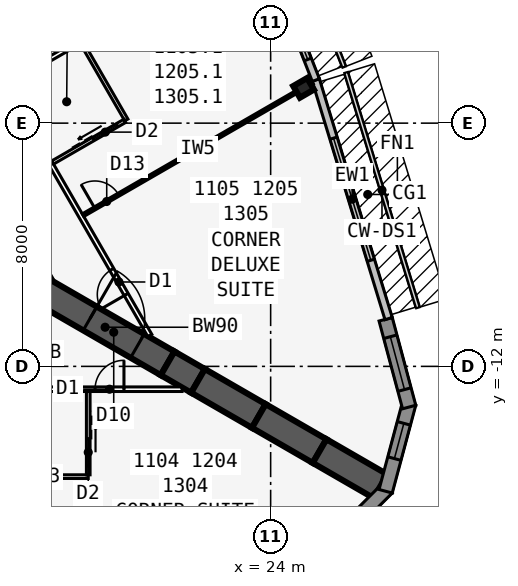
"""IFC4 building model, lengths in metres.
Left out: names, types, materials, properties, quantities, classifications, styles, units other than length and angle.
Written with IfcOpenShell. Run it as: python <this file> out.ifc"""

import sys

from ifc_helpers import new_model, si_unit, direction, frame, frame_2d, origin, origin_2d, place, context, subcontext, project, spatial, polyline, rectangle, i_section, outline, extrude, element, fill, save


model = new_model("IFC4")
c1 = context("Model", 3, precision=1e-05, world=origin(), true_north=direction((0.0, 1.0)))
c2 = subcontext(c1, "Body", "Model", "MODEL_VIEW")
j1 = project(units=[si_unit("LENGTHUNIT", "METRE"), si_unit("PLANEANGLEUNIT", "RADIAN")], contexts=[c1])
p1 = place(None, origin())
s1 = spatial("IfcSite", under=j1, at=p1, CompositionType="ELEMENT")
p2 = place(p1, origin())
s2 = spatial("IfcBuilding", under=s1, at=p2, CompositionType="ELEMENT")
p3 = place(p2, frame((0.0, 0.0, 48.9)))
s3 = spatial("IfcBuildingStorey", under=s2, at=p3, CompositionType="ELEMENT", Elevation=48.9)
p4 = place(p3, frame((16.5, -9.526, 0.0), z_axis=(0.0, 0.0, 1.0), x_axis=(-0.499999749417, 0.866025548458, 0.0)))
e1 = element("IfcWall", 1, at=p4, inside=s3, PredefinedType="SHEAR", context=c2, shape_type="SweptSolid", body=[
    extrude(rectangle(XDim=33.0, YDim=0.9, at=frame_2d((16.5, 0.0))), origin(), (0.0, 0.0, 1.0), 3.4),
])
p5 = place(p4, frame((14.15, 0.0, 0.0)))
e2 = element("IfcOpeningElement", 2, at=p5, cuts=e1, PredefinedType="OPENING", context=c2, shape_type="SweptSolid", body=[
    extrude(rectangle(XDim=1.8, YDim=2.13, at=frame_2d((0.9, 1.065))), frame((0.0, 0.46, 0.0), z_axis=(0.0, -1.0, 0.0), x_axis=(1.0, 0.0, 0.0)), (0.0, 0.0, 1.0), 0.92),
])
p6 = place(p4, frame((12.6, 0.0, 0.0)))
e3 = element("IfcOpeningElement", 3, at=p6, cuts=e1, PredefinedType="OPENING", context=c2, shape_type="SweptSolid", body=[
    extrude(rectangle(XDim=1.0, YDim=2.13, at=frame_2d((0.5, 1.065))), frame((0.0, 0.46, 0.0), z_axis=(0.0, -1.0, 0.0), x_axis=(1.0, 0.0, 0.0)), (0.0, 0.0, 1.0), 0.92),
])
p7 = place(p3, frame((16.5, -9.526, 0.0), z_axis=(0.0, 0.0, 1.0), x_axis=(0.866031398331, -0.499989616998, 0.0)))
e4 = element("IfcWall", 4, at=p7, inside=s3, PredefinedType="SHEAR", context=c2, shape_type="SweptSolid", body=[
    extrude(rectangle(XDim=4.746, YDim=0.9, at=frame_2d((2.373, 0.0))), origin(), (0.0, 0.0, 1.0), 3.4),
])
p8 = place(p7, frame((1.8, 0.0, 0.0)))
e5 = element("IfcOpeningElement", 5, at=p8, cuts=e4, PredefinedType="OPENING", context=c2, shape_type="SweptSolid", body=[
    extrude(rectangle(XDim=1.8, YDim=2.13, at=frame_2d((0.9, 1.065))), frame((0.0, 0.46, 0.0), z_axis=(0.0, -1.0, 0.0), x_axis=(1.0, 0.0, 0.0)), (0.0, 0.0, 1.0), 0.92),
])
p9 = place(p3, frame((20.61, -11.899, 0.0), z_axis=(0.0, 0.0, 1.0), x_axis=(0.866009537788, -0.500027479704, 0.0)))
e6 = element("IfcWall", 6, at=p9, inside=s3, PredefinedType="SHEAR", context=c2, shape_type="SweptSolid", body=[
    extrude(rectangle(XDim=1.155, YDim=0.9, at=frame_2d((0.577, 0.0))), origin(), (0.0, 0.0, 1.0), 3.4),
])
for number, where, z_axis, x_axis in (
    (7, (21.61, -12.477, 0.0), (0.0, 0.0, 1.0), (0.866, -0.5, 0.0)),
    (8, (23.61, -13.631, 0.0), (0.0, 0.0, 1.0), (0.866, -0.5, 0.0)),
    (9, (25.61, -14.786, 0.0), (0.0, 0.0, 1.0), (0.866, -0.5, 0.0)),
):
    element("IfcWall", number, at=place(p3, frame(where, z_axis=z_axis, x_axis=x_axis)), inside=s3, PredefinedType="SHEAR", context=c2, shape_type="SweptSolid", body=[
        extrude(rectangle(XDim=2.309, YDim=0.9, at=frame_2d((1.155, 0.0))), origin(), (0.0, 0.0, 1.0), 3.4),
    ])
p10 = place(p3, frame((25.083, -2.839, 0.0), z_axis=(0.0, 0.0, 1.0), x_axis=(-0.5, 0.866025403784, 0.0)))
e10 = element("IfcColumn", 10, at=p10, inside=s3, PredefinedType="COLUMN", context=c2, shape_type="SweptSolid", body=[
    extrude(i_section(OverallWidth=0.442, OverallDepth=0.531, WebThickness=0.066, FlangeThickness=0.106, at=origin_2d()), origin(), (0.0, 0.0, 1.0), 3.4),
])
p11 = place(p3, frame((25.728, -18.12, 0.0), z_axis=(0.0, 0.0, 1.0), x_axis=(0.707025086683, 0.707188466253, 0.0)))
e11 = element("IfcWall", 11, at=p11, inside=s3, PredefinedType="SOLIDWALL", context=c2, shape_type="SweptSolid", body=[
    extrude(outline(polyline([(2.989, 0.225), (2.93, 0.225), (2.438, 0.093), (2.402, 0.225), (0.0, 0.225), (0.0, -0.225), (2.989, -0.225), (2.989, 0.225)])), origin(), (0.0, 0.0, 1.0), 3.235),
])
p12 = place(p11, frame((0.676, 0.0, 0.45)))
e12 = element("IfcOpeningElement", 12, at=p12, cuts=e11, PredefinedType="OPENING", context=c2, shape_type="SweptSolid", body=[
    extrude(rectangle(XDim=1.2, YDim=2.4, at=frame_2d((0.6, 1.2))), frame((0.0, 0.235, 0.0), z_axis=(0.0, -1.0, 0.0), x_axis=(1.0, 0.0, 0.0)), (0.0, 0.0, 1.0), 0.47),
])
p13 = place(p3, frame((27.783, -16.108, 0.0), z_axis=(0.0, 0.0, 1.0), x_axis=(0.258801419081, 0.965930548995, 0.0)))
e13 = element("IfcWall", 13, at=p13, inside=s3, PredefinedType="SOLIDWALL", context=c2, shape_type="SweptSolid", body=[
    extrude(outline(polyline([(2.989, 0.225), (0.586, 0.225), (0.551, 0.093), (0.06, 0.225), (0.0, 0.225), (0.0, -0.225), (2.989, -0.225), (2.989, 0.225)])), origin(), (0.0, 0.0, 1.0), 3.235),
])
p14 = place(p13, frame((1.113, 0.0, 0.45)))
e14 = element("IfcOpeningElement", 14, at=p14, cuts=e13, PredefinedType="OPENING", context=c2, shape_type="SweptSolid", body=[
    extrude(rectangle(XDim=1.2, YDim=2.4, at=frame_2d((0.6, 1.2))), frame((0.0, 0.235, 0.0), z_axis=(0.0, -1.0, 0.0), x_axis=(1.0, 0.0, 0.0)), (0.0, 0.0, 1.0), 0.47),
])
p15 = place(p3, frame((28.556, -13.337, 0.0), z_axis=(0.0, 0.0, 1.0), x_axis=(-0.258780998834, 0.965936019953, 0.0)))
e15 = element("IfcWall", 15, at=p15, inside=s3, PredefinedType="SOLIDWALL", context=c2, shape_type="SweptSolid", body=[
    extrude(rectangle(XDim=2.989, YDim=0.45, at=frame_2d((1.494, 0.0))), origin(), (0.0, 0.0, 1.0), 3.235),
])
p16 = place(p15, frame((0.594, 0.0, 0.45)))
e16 = element("IfcOpeningElement", 16, at=p16, cuts=e15, PredefinedType="OPENING", context=c2, shape_type="SweptSolid", body=[
    extrude(rectangle(XDim=1.8, YDim=2.4, at=frame_2d((0.9, 1.2))), frame((0.0, 0.235, 0.0), z_axis=(0.0, -1.0, 0.0), x_axis=(1.0, 0.0, 0.0)), (0.0, 0.0, 1.0), 0.47),
])
p17 = place(p3, frame((27.88, -10.429, 0.0), z_axis=(0.0, 0.0, 1.0), x_axis=(-0.2919790669, 0.956424709265, 0.0)))
e17 = element("IfcWall", 17, at=p17, inside=s3, PredefinedType="STANDARD", context=c2, shape_type="SweptSolid", body=[
    extrude(rectangle(XDim=8.211, YDim=0.25, at=frame_2d((4.105, 0.0))), origin(), (0.0, 0.0, 1.0), 3.235),
])
p18 = place(p17, frame((2.006, 0.0, 0.45)))
e18 = element("IfcOpeningElement", 18, at=p18, cuts=e17, PredefinedType="OPENING", context=c2, shape_type="SweptSolid", body=[
    extrude(rectangle(XDim=4.2, YDim=2.4, at=frame_2d((2.1, 1.2))), frame((0.0, 0.135, 0.0), z_axis=(0.0, -1.0, 0.0), x_axis=(1.0, 0.0, 0.0)), (0.0, 0.0, 1.0), 0.27),
])
p19 = place(p3, frame((25.486, -2.584, 0.0), z_axis=(0.0, 0.0, 1.0), x_axis=(-0.364013463868, 0.931393685894, 0.0)))
e19 = element("IfcWall", 19, at=p19, inside=s3, PredefinedType="STANDARD", context=c2, shape_type="SweptSolid", body=[
    extrude(rectangle(XDim=5.058, YDim=0.25, at=frame_2d((2.529, 0.0))), origin(), (0.0, 0.0, 1.0), 3.235),
])
p20 = place(p19, frame((0.729, 0.0, 0.45)))
e20 = element("IfcOpeningElement", 20, at=p20, cuts=e19, PredefinedType="OPENING", context=c2, shape_type="SweptSolid", body=[
    extrude(rectangle(XDim=3.6, YDim=2.4, at=frame_2d((1.8, 1.2))), frame((0.0, 0.135, 0.0), z_axis=(0.0, -1.0, 0.0), x_axis=(1.0, 0.0, 0.0)), (0.0, 0.0, 1.0), 0.27),
])
p21 = place(p3, frame((-21.086, -12.751, 0.0), z_axis=(0.0, 0.0, 1.0), x_axis=(1.0, 0.0, 0.0)))
e21 = element("IfcWall", 21, at=p21, inside=s3, PredefinedType="PARTITIONING", context=c2, shape_type="SweptSolid", body=[
    extrude(rectangle(XDim=42.172, YDim=0.15, at=frame_2d((21.086, 0.0))), origin(), (0.0, 0.0, 1.0), 3.235),
])
p22 = place(p21, frame((2.338, 0.0, 0.0)))
e22 = element("IfcOpeningElement", 22, at=p22, cuts=e21, PredefinedType="OPENING", context=c2, shape_type="SweptSolid", body=[
    extrude(rectangle(XDim=0.95, YDim=2.13, at=frame_2d((0.475, 1.065))), frame((0.0, 0.085, 0.0), z_axis=(0.0, -1.0, 0.0), x_axis=(1.0, 0.0, 0.0)), (0.0, 0.0, 1.0), 0.17),
])
p23 = place(p21, frame((14.311, 0.0, 0.0)))
e23 = element("IfcOpeningElement", 23, at=p23, cuts=e21, PredefinedType="OPENING", context=c2, shape_type="SweptSolid", body=[
    extrude(rectangle(XDim=0.95, YDim=2.13, at=frame_2d((0.475, 1.065))), frame((0.0, 0.085, 0.0), z_axis=(0.0, -1.0, 0.0), x_axis=(1.0, 0.0, 0.0)), (0.0, 0.0, 1.0), 0.17),
])
p24 = place(p21, frame((23.086, 0.0, 0.0)))
e24 = element("IfcOpeningElement", 24, at=p24, cuts=e21, PredefinedType="OPENING", context=c2, shape_type="SweptSolid", body=[
    extrude(rectangle(XDim=1.0, YDim=2.13, at=frame_2d((0.5, 1.065))), frame((0.0, 0.085, 0.0), z_axis=(0.0, -1.0, 0.0), x_axis=(1.0, 0.0, 0.0)), (0.0, 0.0, 1.0), 0.17),
])
p25 = place(p21, frame((29.311, 0.0, 0.0)))
e25 = element("IfcOpeningElement", 25, at=p25, cuts=e21, PredefinedType="OPENING", context=c2, shape_type="SweptSolid", body=[
    extrude(rectangle(XDim=0.95, YDim=2.13, at=frame_2d((0.475, 1.065))), frame((0.0, 0.085, 0.0), z_axis=(0.0, -1.0, 0.0), x_axis=(1.0, 0.0, 0.0)), (0.0, 0.0, 1.0), 0.17),
])
p26 = place(p21, frame((39.311, 0.0, 0.0)))
e26 = element("IfcOpeningElement", 26, at=p26, cuts=e21, PredefinedType="OPENING", context=c2, shape_type="SweptSolid", body=[
    extrude(rectangle(XDim=0.95, YDim=2.13, at=frame_2d((0.475, 1.065))), frame((0.0, 0.085, 0.0), z_axis=(0.0, -1.0, 0.0), x_axis=(1.0, 0.0, 0.0)), (0.0, 0.0, 1.0), 0.17),
])
p27 = place(p3, frame((15.0, -15.626, 0.0), z_axis=(0.0, 0.0, 1.0), x_axis=(1.0, 0.0, 0.0)))
e27 = element("IfcWall", 27, at=p27, inside=s3, PredefinedType="PLUMBINGWALL", context=c2, shape_type="SweptSolid", body=[
    extrude(rectangle(XDim=3.0, YDim=0.12, at=frame_2d((1.5, 0.0))), origin(), (0.0, 0.0, 1.0), 3.235),
])
p28 = place(p3, frame((18.0, -12.826, 0.0), z_axis=(0.0, 0.0, 1.0), x_axis=(0.0, -1.0, 0.0)))
e28 = element("IfcWall", 28, at=p28, inside=s3, PredefinedType="PLUMBINGWALL", context=c2, shape_type="SweptSolid", body=[
    extrude(rectangle(XDim=2.74, YDim=0.12, at=frame_2d((1.37, 0.0))), origin(), (0.0, 0.0, 1.0), 3.235),
])
p29 = place(p28, frame((1.55, 0.0, 0.0)))
e29 = element("IfcOpeningElement", 29, at=p29, cuts=e28, PredefinedType="OPENING", context=c2, shape_type="SweptSolid", body=[
    extrude(rectangle(XDim=0.9, YDim=2.13, at=frame_2d((0.45, 1.065))), frame((0.0, 0.07, 0.0), z_axis=(0.0, -1.0, 0.0), x_axis=(1.0, 0.0, 0.0)), (0.0, 0.0, 1.0), 0.14),
])
p30 = place(p3, frame((20.027, -10.985, 0.0), z_axis=(0.0, 0.0, 1.0), x_axis=(-0.500001677587, 0.866024435227, 0.0)))
e30 = element("IfcWall", 30, at=p30, inside=s3, PredefinedType="PARTITIONING", context=c2, shape_type="SweptSolid", body=[
    extrude(rectangle(XDim=39.054, YDim=0.15, at=frame_2d((19.527, 0.0))), origin(), (0.0, 0.0, 1.0), 3.235),
])
p31 = place(p30, frame((1.558, 0.0, 0.0)))
e31 = element("IfcOpeningElement", 31, at=p31, cuts=e30, PredefinedType="OPENING", context=c2, shape_type="SweptSolid", body=[
    extrude(rectangle(XDim=0.95, YDim=2.13, at=frame_2d((0.475, 1.065))), frame((0.0, 0.085, 0.0), z_axis=(0.0, -1.0, 0.0), x_axis=(1.0, 0.0, 0.0)), (0.0, 0.0, 1.0), 0.17),
])
p32 = place(p30, frame((12.152, 0.0, 0.0)))
e32 = element("IfcOpeningElement", 32, at=p32, cuts=e30, PredefinedType="OPENING", context=c2, shape_type="SweptSolid", body=[
    extrude(rectangle(XDim=0.95, YDim=2.13, at=frame_2d((0.475, 1.065))), frame((0.0, 0.085, 0.0), z_axis=(0.0, -1.0, 0.0), x_axis=(1.0, 0.0, 0.0)), (0.0, 0.0, 1.0), 0.17),
])
p33 = place(p30, frame((17.152, 0.0, 0.0)))
e33 = element("IfcOpeningElement", 33, at=p33, cuts=e30, PredefinedType="OPENING", context=c2, shape_type="SweptSolid", body=[
    extrude(rectangle(XDim=0.95, YDim=2.13, at=frame_2d((0.475, 1.065))), frame((0.0, 0.085, 0.0), z_axis=(0.0, -1.0, 0.0), x_axis=(1.0, 0.0, 0.0)), (0.0, 0.0, 1.0), 0.17),
])
p34 = place(p30, frame((21.552, 0.0, 0.0)))
e34 = element("IfcOpeningElement", 34, at=p34, cuts=e30, PredefinedType="OPENING", context=c2, shape_type="SweptSolid", body=[
    extrude(rectangle(XDim=0.95, YDim=2.13, at=frame_2d((0.475, 1.065))), frame((0.0, 0.085, 0.0), z_axis=(0.0, -1.0, 0.0), x_axis=(1.0, 0.0, 0.0)), (0.0, 0.0, 1.0), 0.17),
])
p35 = place(p30, frame((32.152, 0.0, 0.0)))
e35 = element("IfcOpeningElement", 35, at=p35, cuts=e30, PredefinedType="OPENING", context=c2, shape_type="SweptSolid", body=[
    extrude(rectangle(XDim=0.95, YDim=2.13, at=frame_2d((0.475, 1.065))), frame((0.0, 0.085, 0.0), z_axis=(0.0, -1.0, 0.0), x_axis=(1.0, 0.0, 0.0)), (0.0, 0.0, 1.0), 0.17),
])
p36 = place(p30, frame((37.752, 0.0, 0.0)))
e36 = element("IfcOpeningElement", 36, at=p36, cuts=e30, PredefinedType="OPENING", context=c2, shape_type="SweptSolid", body=[
    extrude(rectangle(XDim=0.95, YDim=2.13, at=frame_2d((0.475, 1.065))), frame((0.0, 0.085, 0.0), z_axis=(0.0, -1.0, 0.0), x_axis=(1.0, 0.0, 0.0)), (0.0, 0.0, 1.0), 0.17),
])
p37 = place(p3, frame((17.829, -7.027, 0.0), z_axis=(0.0, 0.0, 1.0), x_axis=(0.866032659912, 0.499987431809, 0.0)))
e37 = element("IfcWall", 37, at=p37, inside=s3, PredefinedType="PARTITIONING", context=c2, shape_type="SweptSolid", body=[
    extrude(rectangle(XDim=8.72, YDim=0.1, at=frame_2d((4.36, 0.0))), origin(), (0.0, 0.0, 1.0), 2.389),
])
p38 = place(p37, frame((0.45, 0.0, 0.0)))
e38 = element("IfcOpeningElement", 38, at=p38, cuts=e37, PredefinedType="OPENING", context=c2, shape_type="SweptSolid", body=[
    extrude(rectangle(XDim=0.9, YDim=2.13, at=frame_2d((0.45, 1.065))), frame((0.0, 0.06, 0.0), z_axis=(0.0, -1.0, 0.0), x_axis=(1.0, 0.0, 0.0)), (0.0, 0.0, 1.0), 0.12),
])
p39 = place(p3, frame((15.329, -2.697, 0.0), z_axis=(0.0, 0.0, 1.0), x_axis=(0.866018409083, 0.500012114982, 0.0)))
e39 = element("IfcWall", 39, at=p39, inside=s3, PredefinedType="PARTITIONING", context=c2, shape_type="SweptSolid", body=[
    extrude(rectangle(XDim=9.485, YDim=0.15, at=frame_2d((4.742, 0.0))), origin(), (0.0, 0.0, 1.0), 2.389),
])
p40 = place(p3, frame((19.253, -3.895, 0.0), z_axis=(0.0, 0.0, 1.0), x_axis=(-0.499990139034, 0.866031096941, 0.0)))
e40 = element("IfcWall", 40, at=p40, inside=s3, PredefinedType="PLUMBINGWALL", context=c2, shape_type="SweptSolid", body=[
    extrude(rectangle(XDim=3.0, YDim=0.12, at=frame_2d((1.5, 0.0))), origin(), (0.0, 0.0, 1.0), 3.235),
])
p41 = place(p3, frame((16.829, -5.295, 0.0), z_axis=(0.0, 0.0, 1.0), x_axis=(0.866035715982, 0.499982138324, 0.0)))
e41 = element("IfcWall", 41, at=p41, inside=s3, PredefinedType="PLUMBINGWALL", context=c2, shape_type="SweptSolid", body=[
    extrude(rectangle(XDim=2.74, YDim=0.12, at=frame_2d((1.37, 0.0))), origin(), (0.0, 0.0, 1.0), 3.235),
])
p42 = place(p41, frame((1.55, 0.0, 0.0)))
e42 = element("IfcOpeningElement", 42, at=p42, cuts=e41, PredefinedType="OPENING", context=c2, shape_type="SweptSolid", body=[
    extrude(rectangle(XDim=0.9, YDim=2.13, at=frame_2d((0.45, 1.065))), frame((0.0, 0.07, 0.0), z_axis=(0.0, -1.0, 0.0), x_axis=(1.0, 0.0, 0.0)), (0.0, 0.0, 1.0), 0.14),
])
p43 = place(p14, origin())
e43 = element("IfcWindow", 43, at=p43, inside=s3, PartitioningType="SINGLE_PANEL", PredefinedType="WINDOW", context=c2, shape_type="SweptSolid", body=[
    extrude(rectangle(XDim=1.2, YDim=2.4, at=frame_2d((0.6, 1.2))), frame((0.0, 0.03, 0.0), z_axis=(0.0, -1.0, 0.0), x_axis=(1.0, 0.0, 0.0)), (0.0, 0.0, 1.0), 0.06),
])
fill(e14, e43)
p44 = place(p16, origin())
e44 = element("IfcWindow", 44, at=p44, inside=s3, PartitioningType="SINGLE_PANEL", PredefinedType="WINDOW", context=c2, shape_type="SweptSolid", body=[
    extrude(rectangle(XDim=1.8, YDim=2.4, at=frame_2d((0.9, 1.2))), frame((0.0, 0.03, 0.0), z_axis=(0.0, -1.0, 0.0), x_axis=(1.0, 0.0, 0.0)), (0.0, 0.0, 1.0), 0.06),
])
fill(e16, e44)
p45 = place(p18, origin())
e45 = element("IfcWindow", 45, at=p45, inside=s3, PartitioningType="SINGLE_PANEL", PredefinedType="WINDOW", context=c2, shape_type="SweptSolid", body=[
    extrude(rectangle(XDim=4.2, YDim=2.4, at=frame_2d((2.1, 1.2))), frame((0.0, 0.03, 0.0), z_axis=(0.0, -1.0, 0.0), x_axis=(1.0, 0.0, 0.0)), (0.0, 0.0, 1.0), 0.06),
])
fill(e18, e45)
p46 = place(p20, origin())
e46 = element("IfcWindow", 46, at=p46, inside=s3, PartitioningType="SINGLE_PANEL", PredefinedType="WINDOW", context=c2, shape_type="SweptSolid", body=[
    extrude(rectangle(XDim=3.6, YDim=2.4, at=frame_2d((1.8, 1.2))), frame((0.0, 0.03, 0.0), z_axis=(0.0, -1.0, 0.0), x_axis=(1.0, 0.0, 0.0)), (0.0, 0.0, 1.0), 0.06),
])
fill(e20, e46)
p47 = place(p29, origin())
e47 = element("IfcDoor", 47, at=p47, inside=s3, OperationType="SLIDING_TO_LEFT", PredefinedType="DOOR", context=c2, shape_type="SweptSolid", body=[
    extrude(rectangle(XDim=0.9, YDim=2.13, at=frame_2d((0.45, 1.065))), frame((0.0, 0.025, 0.0), z_axis=(0.0, -1.0, 0.0), x_axis=(1.0, 0.0, 0.0)), (0.0, 0.0, 1.0), 0.05),
])
fill(e29, e47)
p48 = place(p26, origin())
e48 = element("IfcDoor", 48, at=p48, inside=s3, OperationType="SINGLE_SWING_RIGHT", PredefinedType="DOOR", context=c2, shape_type="SweptSolid", body=[
    extrude(rectangle(XDim=0.95, YDim=2.13, at=frame_2d((0.475, 1.065))), frame((0.0, 0.025, 0.0), z_axis=(0.0, -1.0, 0.0), x_axis=(1.0, 0.0, 0.0)), (0.0, 0.0, 1.0), 0.05),
])
fill(e26, e48)
p49 = place(p38, origin())
e49 = element("IfcDoor", 49, at=p49, inside=s3, OperationType="SINGLE_SWING_LEFT", PredefinedType="DOOR", context=c2, shape_type="SweptSolid", body=[
    extrude(rectangle(XDim=0.9, YDim=2.13, at=frame_2d((0.45, 1.065))), frame((0.0, 0.025, 0.0), z_axis=(0.0, -1.0, 0.0), x_axis=(1.0, 0.0, 0.0)), (0.0, 0.0, 1.0), 0.05),
])
fill(e38, e49)
p50 = place(p31, origin())
e50 = element("IfcDoor", 50, at=p50, inside=s3, OperationType="SINGLE_SWING_LEFT", PredefinedType="DOOR", context=c2, shape_type="SweptSolid", body=[
    extrude(rectangle(XDim=0.95, YDim=2.13, at=frame_2d((0.475, 1.065))), frame((0.0, 0.025, 0.0), z_axis=(0.0, -1.0, 0.0), x_axis=(1.0, 0.0, 0.0)), (0.0, 0.0, 1.0), 0.05),
])
fill(e31, e50)
p51 = place(p42, origin())
e51 = element("IfcDoor", 51, at=p51, inside=s3, OperationType="SLIDING_TO_LEFT", PredefinedType="DOOR", context=c2, shape_type="SweptSolid", body=[
    extrude(rectangle(XDim=0.9, YDim=2.13, at=frame_2d((0.45, 1.065))), frame((0.0, 0.025, 0.0), z_axis=(0.0, -1.0, 0.0), x_axis=(1.0, 0.0, 0.0)), (0.0, 0.0, 1.0), 0.05),
])
fill(e42, e51)
p52 = place(p8, origin())
e52 = element("IfcDoor", 52, at=p52, inside=s3, OperationType="DOUBLE_DOOR_DOUBLE_SWING", PredefinedType="DOOR", context=c2, shape_type="SweptSolid", body=[
    extrude(rectangle(XDim=1.8, YDim=2.13, at=frame_2d((0.9, 1.065))), frame((0.0, 0.025, 0.0), z_axis=(0.0, -1.0, 0.0), x_axis=(1.0, 0.0, 0.0)), (0.0, 0.0, 1.0), 0.05),
])
fill(e5, e52)
save(model, sys.argv[1])
